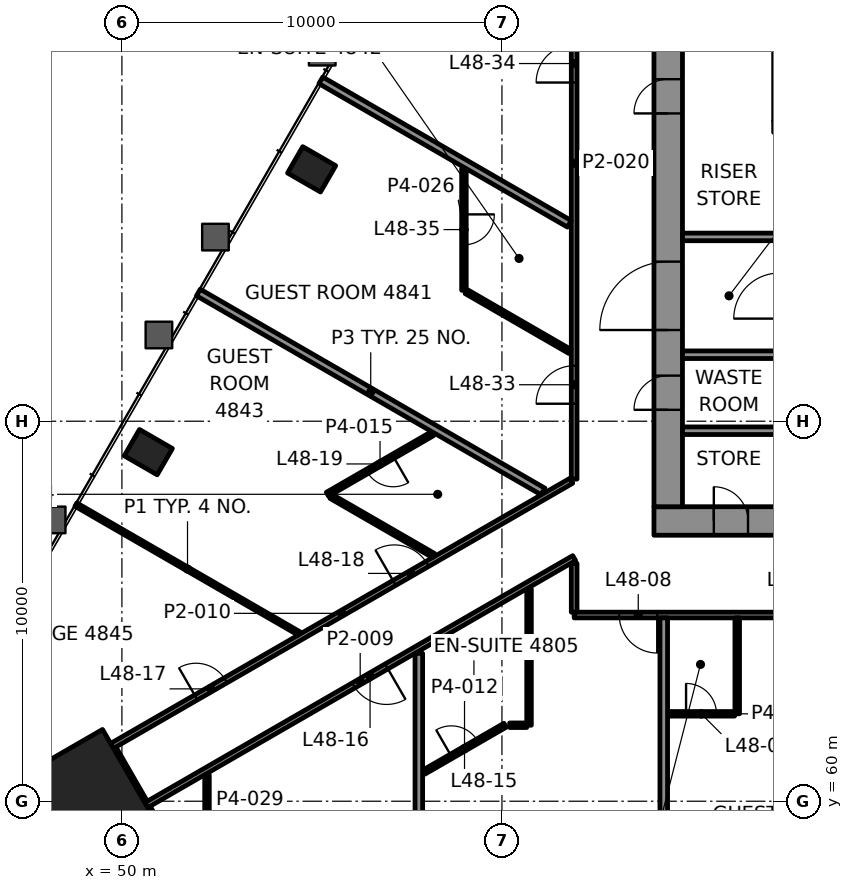
"""IFC4 building model, lengths in metres.
Left out: names, types, materials, properties, quantities, classifications, styles, units other than length and angle.
Written with IfcOpenShell. Run it as: python <this file> out.ifc"""

import sys

from ifc_helpers import new_model, si_unit, direction, frame, frame_2d, origin, origin_2d, place, context, subcontext, project, spatial, rectangle, hollow_rectangle, extrude, element, fill, save


model = new_model("IFC4")
c1 = context("Model", 3, precision=1e-05, world=origin(), true_north=direction((0.0, 1.0)))
c2 = subcontext(c1, "Body", "Model", "MODEL_VIEW")
j1 = project(units=[si_unit("LENGTHUNIT", "METRE"), si_unit("PLANEANGLEUNIT", "RADIAN")], contexts=[c1])
p1 = place(None, origin())
s1 = spatial("IfcSite", under=j1, at=p1, CompositionType="ELEMENT")
p2 = place(p1, origin())
s2 = spatial("IfcBuilding", under=s1, at=p2, CompositionType="ELEMENT")
p3 = place(p2, frame((0.0, 0.0, 206.5)))
s3 = spatial("IfcBuildingStorey", under=s2, at=p3, CompositionType="ELEMENT", Elevation=206.5)
p4 = place(p3, frame((48.978, 59.976, 0.0), z_axis=(0.0, 0.0, 1.0), x_axis=(0.5, -0.866025403784, 0.0)))
e1 = element("IfcColumn", 1, at=p4, inside=s3, PredefinedType="COLUMN", context=c2, shape_type="SweptSolid", body=[
    extrude(rectangle(XDim=2.8, YDim=2.8, at=origin_2d()), origin(), (0.0, 0.0, 1.0), 3.9),
])
for number, where, z_axis, x_axis in (
    (2, (54.992, 76.628, -0.0), (0.0, 0.0, 1.0), (-0.5, -0.866, 0.0)),
    (3, (50.695, 69.186, -0.0), (0.0, 0.0, 1.0), (-0.5, -0.866, 0.0)),
):
    element("IfcColumn", number, at=place(p3, frame(where, z_axis=z_axis, x_axis=x_axis)), inside=s3, PredefinedType="COLUMN", context=c2, shape_type="SweptSolid", body=[
        extrude(hollow_rectangle(XDim=0.8, YDim=1.0, WallThickness=0.05, at=origin_2d()), origin(), (0.0, 0.0, 1.0), 3.9),
    ])
p5 = place(p3, frame((64.0, 67.375, 0.0), z_axis=(0.0, 0.0, 1.0), x_axis=(1.0, 0.0, 0.0)))
e4 = element("IfcWall", 4, at=p5, inside=s3, PredefinedType="SHEAR", context=c2, shape_type="SweptSolid", body=[
    extrude(rectangle(XDim=22.0, YDim=0.75, at=frame_2d((11.0, 0.0))), origin(), (0.0, 0.0, 1.0), 3.7),
])
p6 = place(p5, frame((1.575, 0.0, 0.0)))
e5 = element("IfcOpeningElement", 5, at=p6, cuts=e4, PredefinedType="OPENING", context=c2, shape_type="SweptSolid", body=[
    extrude(rectangle(XDim=0.9, YDim=2.1, at=frame_2d((0.45, 1.05))), frame((0.0, 0.385, 0.0), z_axis=(0.0, -1.0, 0.0), x_axis=(1.0, 0.0, 0.0)), (0.0, 0.0, 1.0), 0.77),
])
p7 = place(p5, frame((4.425, 0.0, 0.0)))
e6 = element("IfcOpeningElement", 6, at=p7, cuts=e4, PredefinedType="OPENING", context=c2, shape_type="SweptSolid", body=[
    extrude(rectangle(XDim=0.9, YDim=2.1, at=frame_2d((0.45, 1.05))), frame((0.0, 0.385, 0.0), z_axis=(0.0, -1.0, 0.0), x_axis=(1.0, 0.0, 0.0)), (0.0, 0.0, 1.0), 0.77),
])
p8 = place(p3, frame((64.375, 67.75, 0.0), z_axis=(0.0, 0.0, 1.0), x_axis=(0.0, 1.0, 0.0)))
e7 = element("IfcWall", 7, at=p8, inside=s3, PredefinedType="SHEAR", context=c2, shape_type="SweptSolid", body=[
    extrude(rectangle(XDim=14.5, YDim=0.75, at=frame_2d((7.25, 0.0))), origin(), (0.0, 0.0, 1.0), 3.7),
])
p9 = place(p8, frame((4.65, 0.0, 0.0)))
e8 = element("IfcOpeningElement", 8, at=p9, cuts=e7, PredefinedType="OPENING", context=c2, shape_type="SweptSolid", body=[
    extrude(rectangle(XDim=1.8, YDim=2.1, at=frame_2d((0.9, 1.05))), frame((0.0, 0.385, 0.0), z_axis=(0.0, -1.0, 0.0), x_axis=(1.0, 0.0, 0.0)), (0.0, 0.0, 1.0), 0.77),
])
p10 = place(p8, frame((2.55, 0.0, 0.0)))
e9 = element("IfcOpeningElement", 9, at=p10, cuts=e7, PredefinedType="OPENING", context=c2, shape_type="SweptSolid", body=[
    extrude(rectangle(XDim=0.9, YDim=2.1, at=frame_2d((0.45, 1.05))), frame((0.0, 0.385, 0.0), z_axis=(0.0, -1.0, 0.0), x_axis=(1.0, 0.0, 0.0)), (0.0, 0.0, 1.0), 0.77),
])
p11 = place(p8, frame((10.35, 0.0, 0.0)))
e10 = element("IfcOpeningElement", 10, at=p11, cuts=e7, PredefinedType="OPENING", context=c2, shape_type="SweptSolid", body=[
    extrude(rectangle(XDim=0.9, YDim=2.1, at=frame_2d((0.45, 1.05))), frame((0.0, 0.385, 0.0), z_axis=(0.0, -1.0, 0.0), x_axis=(1.0, 0.0, 0.0)), (0.0, 0.0, 1.0), 0.77),
])
p12 = place(p3, frame((60.203, 62.0, 0.0), z_axis=(0.0, 0.0, 1.0), x_axis=(1.0, 0.0, 0.0)))
e11 = element("IfcWall", 11, at=p12, inside=s3, PredefinedType="PARTITIONING", context=c2, shape_type="SweptSolid", body=[
    extrude(rectangle(XDim=0.449, YDim=0.12, at=frame_2d((0.225, 0.0))), origin(), (0.0, 0.0, 1.0), 3.1),
])
p13 = place(p3, frame((64.368, 62.3, 0.0), z_axis=(0.0, 0.0, 1.0), x_axis=(1.0, 0.0, 0.0)))
e12 = element("IfcWall", 12, at=p13, inside=s3, PredefinedType="PARTITIONING", context=c2, shape_type="SweptSolid", body=[
    extrude(rectangle(XDim=1.753, YDim=0.12, at=frame_2d((0.877, 0.0))), origin(), (0.0, 0.0, 1.0), 3.1),
])
p14 = place(p13, frame((0.477, 0.0, 0.0)))
e13 = element("IfcOpeningElement", 13, at=p14, cuts=e12, PredefinedType="OPENING", context=c2, shape_type="SweptSolid", body=[
    extrude(rectangle(XDim=0.8, YDim=2.1, at=frame_2d((0.4, 1.05))), frame((0.0, 0.07, 0.0), z_axis=(0.0, -1.0, 0.0), x_axis=(1.0, 0.0, 0.0)), (0.0, 0.0, 1.0), 0.14),
])
p15 = place(p3, frame((88.1, 64.9, 0.0), z_axis=(0.0, 0.0, 1.0), x_axis=(-1.0, 0.0, 0.0)))
e14 = element("IfcWall", 14, at=p15, inside=s3, PredefinedType="PARTITIONING", context=c2, shape_type="SweptSolid", body=[
    extrude(rectangle(XDim=26.2, YDim=0.15, at=frame_2d((13.1, 0.0))), origin(), (0.0, 0.0, 1.0), 3.1),
])
p16 = place(p15, frame((7.443, 0.0, 0.0)))
e15 = element("IfcOpeningElement", 15, at=p16, cuts=e14, PredefinedType="OPENING", context=c2, shape_type="SweptSolid", body=[
    extrude(rectangle(XDim=1.0, YDim=2.1, at=frame_2d((0.5, 1.05))), frame((0.0, 0.085, 0.0), z_axis=(0.0, -1.0, 0.0), x_axis=(1.0, 0.0, 0.0)), (0.0, 0.0, 1.0), 0.17),
])
p17 = place(p15, frame((16.037, 0.0, 0.0)))
e16 = element("IfcOpeningElement", 16, at=p17, cuts=e14, PredefinedType="OPENING", context=c2, shape_type="SweptSolid", body=[
    extrude(rectangle(XDim=1.0, YDim=2.1, at=frame_2d((0.5, 1.05))), frame((0.0, 0.085, 0.0), z_axis=(0.0, -1.0, 0.0), x_axis=(1.0, 0.0, 0.0)), (0.0, 0.0, 1.0), 0.17),
])
p18 = place(p15, frame((19.747, 0.0, 0.0)))
e17 = element("IfcOpeningElement", 17, at=p18, cuts=e14, PredefinedType="OPENING", context=c2, shape_type="SweptSolid", body=[
    extrude(rectangle(XDim=1.0, YDim=2.1, at=frame_2d((0.5, 1.05))), frame((0.0, 0.085, 0.0), z_axis=(0.0, -1.0, 0.0), x_axis=(1.0, 0.0, 0.0)), (0.0, 0.0, 1.0), 0.17),
])
p19 = place(p15, frame((24.013, 0.0, 0.0)))
e18 = element("IfcOpeningElement", 18, at=p19, cuts=e14, PredefinedType="OPENING", context=c2, shape_type="SweptSolid", body=[
    extrude(rectangle(XDim=1.0, YDim=2.1, at=frame_2d((0.5, 1.05))), frame((0.0, 0.085, 0.0), z_axis=(0.0, -1.0, 0.0), x_axis=(1.0, 0.0, 0.0)), (0.0, 0.0, 1.0), 0.17),
])
p20 = place(p3, frame((57.947, 60.767, 0.0), z_axis=(0.0, 0.0, 1.0), x_axis=(0.866060325455, 0.499939509014, 0.0)))
e19 = element("IfcWall", 19, at=p20, inside=s3, PredefinedType="PARTITIONING", context=c2, shape_type="SweptSolid", body=[
    extrude(rectangle(XDim=2.467, YDim=0.12, at=frame_2d((1.233, 0.0))), origin(), (0.0, 0.0, 1.0), 3.1),
])
p21 = place(p20, frame((0.833, 0.0, 0.0)))
e20 = element("IfcOpeningElement", 20, at=p21, cuts=e19, PredefinedType="OPENING", context=c2, shape_type="SweptSolid", body=[
    extrude(rectangle(XDim=0.8, YDim=2.1, at=frame_2d((0.4, 1.05))), frame((0.0, 0.07, 0.0), z_axis=(0.0, -1.0, 0.0), x_axis=(1.0, 0.0, 0.0)), (0.0, 0.0, 1.0), 0.14),
])
p22 = place(p3, frame((61.9, 66.397, 0.0), z_axis=(0.0, 0.0, 1.0), x_axis=(-0.866028610752, -0.499994445327, 0.0)))
e21 = element("IfcWall", 21, at=p22, inside=s3, PredefinedType="PARTITIONING", context=c2, shape_type="SweptSolid", body=[
    extrude(rectangle(XDim=13.002, YDim=0.15, at=frame_2d((6.501, 0.0))), origin(), (0.0, 0.0, 1.0), 2.947),
])
p23 = place(p22, frame((5.701, 0.0, 0.0)))
e22 = element("IfcOpeningElement", 22, at=p23, cuts=e21, PredefinedType="OPENING", context=c2, shape_type="SweptSolid", body=[
    extrude(rectangle(XDim=1.0, YDim=2.1, at=frame_2d((0.5, 1.05))), frame((0.0, 0.085, 0.0), z_axis=(0.0, -1.0, 0.0), x_axis=(1.0, 0.0, 0.0)), (0.0, 0.0, 1.0), 0.17),
])
p24 = place(p3, frame((49.74, 61.456, 0.0), z_axis=(0.0, 0.0, 1.0), x_axis=(0.866030582951, 0.499991029314, 0.0)))
e23 = element("IfcWall", 23, at=p24, inside=s3, PredefinedType="PARTITIONING", context=c2, shape_type="SweptSolid", body=[
    extrude(rectangle(XDim=13.954, YDim=0.15, at=frame_2d((6.977, 0.0))), origin(), (0.0, 0.0, 1.0), 3.1),
])
p25 = place(p24, frame((2.552, 0.0, 0.0)))
e24 = element("IfcOpeningElement", 24, at=p25, cuts=e23, PredefinedType="OPENING", context=c2, shape_type="SweptSolid", body=[
    extrude(rectangle(XDim=0.9, YDim=2.1, at=frame_2d((0.45, 1.05))), frame((0.0, 0.085, 0.0), z_axis=(0.0, -1.0, 0.0), x_axis=(1.0, 0.0, 0.0)), (0.0, 0.0, 1.0), 0.17),
])
p26 = place(p24, frame((8.579, 0.0, 0.0)))
e25 = element("IfcOpeningElement", 25, at=p26, cuts=e23, PredefinedType="OPENING", context=c2, shape_type="SweptSolid", body=[
    extrude(rectangle(XDim=1.0, YDim=2.1, at=frame_2d((0.5, 1.05))), frame((0.0, 0.085, 0.0), z_axis=(0.0, -1.0, 0.0), x_axis=(1.0, 0.0, 0.0)), (0.0, 0.0, 1.0), 0.17),
])
p27 = place(p3, frame((58.175, 69.674, 0.0), z_axis=(0.0, 0.0, 1.0), x_axis=(-0.866051923801, -0.49995406317, 0.0)))
e26 = element("IfcWall", 26, at=p27, inside=s3, PredefinedType="PARTITIONING", context=c2, shape_type="SweptSolid", body=[
    extrude(rectangle(XDim=3.194, YDim=0.12, at=frame_2d((1.597, 0.0))), origin(), (0.0, 0.0, 1.0), 3.1),
])
p28 = place(p27, frame((1.197, 0.0, 0.0)))
e27 = element("IfcOpeningElement", 27, at=p28, cuts=e26, PredefinedType="OPENING", context=c2, shape_type="SweptSolid", body=[
    extrude(rectangle(XDim=0.8, YDim=2.1, at=frame_2d((0.4, 1.05))), frame((0.0, 0.07, 0.0), z_axis=(0.0, -1.0, 0.0), x_axis=(1.0, 0.0, 0.0)), (0.0, 0.0, 1.0), 0.14),
])
p29 = place(p3, frame((66.191, 62.3, 0.0), z_axis=(0.0, 0.0, 1.0), x_axis=(0.0, 1.0, 0.0)))
e28 = element("IfcWall", 28, at=p29, inside=s3, PredefinedType="PARTITIONING", context=c2, shape_type="SweptSolid", body=[
    extrude(rectangle(XDim=2.525, YDim=0.12, at=frame_2d((1.262, 0.0))), origin(), (0.0, 0.0, 1.0), 3.1),
])
p30 = place(p3, frame((64.258, 55.898, 0.0), z_axis=(0.0, 0.0, 1.0), x_axis=(0.0, 1.0, 0.0)))
e29 = element("IfcWall", 29, at=p30, inside=s3, PredefinedType="PARTITIONING", context=c2, shape_type="SweptSolid", body=[
    extrude(rectangle(XDim=8.927, YDim=0.2, at=frame_2d((4.463, 0.0))), origin(), (0.0, 0.0, 1.0), 3.022),
])
p31 = place(p3, frame((61.9, 64.975, 0.0), z_axis=(0.0, 0.0, 1.0), x_axis=(0.0, 1.0, 0.0)))
e30 = element("IfcWall", 30, at=p31, inside=s3, PredefinedType="PARTITIONING", context=c2, shape_type="SweptSolid", body=[
    extrude(rectangle(XDim=1.286, YDim=0.15, at=frame_2d((0.643, 0.0))), origin(), (0.0, 0.0, 1.0), 2.947),
])
p32 = place(p3, frame((61.9, 68.476, 0.0), z_axis=(0.0, 0.0, 1.0), x_axis=(0.0, 1.0, 0.0)))
e31 = element("IfcWall", 31, at=p32, inside=s3, PredefinedType="PARTITIONING", context=c2, shape_type="SweptSolid", body=[
    extrude(rectangle(XDim=16.624, YDim=0.15, at=frame_2d((8.312, 0.0))), origin(), (0.0, 0.0, 1.0), 3.1),
])
p33 = place(p32, frame((1.984, 0.0, 0.0)))
e32 = element("IfcOpeningElement", 32, at=p33, cuts=e31, PredefinedType="OPENING", context=c2, shape_type="SweptSolid", body=[
    extrude(rectangle(XDim=1.0, YDim=2.1, at=frame_2d((0.5, 1.05))), frame((0.0, 0.085, 0.0), z_axis=(0.0, -1.0, 0.0), x_axis=(1.0, 0.0, 0.0)), (0.0, 0.0, 1.0), 0.17),
])
p34 = place(p32, frame((10.437, 0.0, 0.0)))
e33 = element("IfcOpeningElement", 33, at=p34, cuts=e31, PredefinedType="OPENING", context=c2, shape_type="SweptSolid", body=[
    extrude(rectangle(XDim=1.0, YDim=2.1, at=frame_2d((0.5, 1.05))), frame((0.0, 0.085, 0.0), z_axis=(0.0, -1.0, 0.0), x_axis=(1.0, 0.0, 0.0)), (0.0, 0.0, 1.0), 0.17),
])
p35 = place(p3, frame((60.713, 62.0, 0.0), z_axis=(0.0, 0.0, 1.0), x_axis=(0.0, 1.0, 0.0)))
e34 = element("IfcWall", 34, at=p35, inside=s3, PredefinedType="PARTITIONING", context=c2, shape_type="SweptSolid", body=[
    extrude(rectangle(XDim=3.585, YDim=0.12, at=frame_2d((1.793, 0.0))), origin(), (0.0, 0.0, 1.0), 2.947),
])
p36 = place(p3, frame((59.0, 76.64, 0.0), z_axis=(0.0, 0.0, 1.0), x_axis=(0.0, -1.0, 0.0)))
e35 = element("IfcWall", 35, at=p36, inside=s3, PredefinedType="PARTITIONING", context=c2, shape_type="SweptSolid", body=[
    extrude(rectangle(XDim=3.194, YDim=0.12, at=frame_2d((1.597, 0.0))), origin(), (0.0, 0.0, 1.0), 3.1),
])
p37 = place(p36, frame((1.197, 0.0, 0.0)))
e36 = element("IfcOpeningElement", 36, at=p37, cuts=e35, PredefinedType="OPENING", context=c2, shape_type="SweptSolid", body=[
    extrude(rectangle(XDim=0.8, YDim=2.1, at=frame_2d((0.4, 1.05))), frame((0.0, 0.07, 0.0), z_axis=(0.0, -1.0, 0.0), x_axis=(1.0, 0.0, 0.0)), (0.0, 0.0, 1.0), 0.14),
])
p38 = place(p3, frame((57.813, 57.358, 0.0), z_axis=(0.0, 0.0, 1.0), x_axis=(0.0, 1.0, 0.0)))
e37 = element("IfcWall", 37, at=p38, inside=s3, PredefinedType="PARTITIONING", context=c2, shape_type="SweptSolid", body=[
    extrude(rectangle(XDim=6.532, YDim=0.2, at=frame_2d((3.266, 0.0))), origin(), (0.0, 0.0, 1.0), 3.1),
])
p39 = place(p3, frame((52.239, 57.125, 0.0), z_axis=(0.0, 0.0, 1.0), x_axis=(0.0, 1.0, 0.0)))
e38 = element("IfcWall", 38, at=p39, inside=s3, PredefinedType="PARTITIONING", context=c2, shape_type="SweptSolid", body=[
    extrude(rectangle(XDim=3.569, YDim=0.12, at=frame_2d((1.784, 0.0))), origin(), (0.0, 0.0, 1.0), 3.1),
])
p40 = place(p39, frame((1.384, 0.0, 0.0)))
e39 = element("IfcOpeningElement", 39, at=p40, cuts=e38, PredefinedType="OPENING", context=c2, shape_type="SweptSolid", body=[
    extrude(rectangle(XDim=0.8, YDim=2.1, at=frame_2d((0.4, 1.05))), frame((0.0, 0.07, 0.0), z_axis=(0.0, -1.0, 0.0), x_axis=(1.0, 0.0, 0.0)), (0.0, 0.0, 1.0), 0.14),
])
p41 = place(p3, frame((50.86, 59.516, 0.0), z_axis=(0.0, 0.0, 1.0), x_axis=(-0.499741784413, 0.866174433305, 0.0)))
e40 = element("IfcWall", 40, at=p41, inside=s3, PredefinedType="PARTITIONING", context=c2, shape_type="SweptSolid", body=[
    extrude(rectangle(XDim=0.365, YDim=0.15, at=frame_2d((0.182, 0.0))), origin(), (0.0, 0.0, 1.0), 3.1),
])
p42 = place(p3, frame((61.773, 75.195, 0.0), z_axis=(0.0, 0.0, 1.0), x_axis=(-0.866025649656, 0.499999574138, 0.0)))
e41 = element("IfcWall", 41, at=p42, inside=s3, PredefinedType="PARTITIONING", context=c2, shape_type="SweptSolid", body=[
    extrude(rectangle(XDim=7.55, YDim=0.2, at=frame_2d((3.775, 0.0))), origin(), (0.0, 0.0, 1.0), 3.022),
])
p43 = place(p3, frame((61.79, 71.835, 0.0), z_axis=(0.0, 0.0, 1.0), x_axis=(-0.866028267601, 0.499995039691, 0.0)))
e42 = element("IfcWall", 42, at=p43, inside=s3, PredefinedType="PARTITIONING", context=c2, shape_type="SweptSolid", body=[
    extrude(rectangle(XDim=3.153, YDim=0.12, at=frame_2d((1.576, 0.0))), origin(), (0.0, 0.0, 1.0), 3.1),
])
p44 = place(p3, frame((61.082, 68.15, 0.0), z_axis=(0.0, 0.0, 1.0), x_axis=(-0.866022549299, 0.50000494408, 0.0)))
e43 = element("IfcWall", 43, at=p44, inside=s3, PredefinedType="PARTITIONING", context=c2, shape_type="SweptSolid", body=[
    extrude(rectangle(XDim=10.474, YDim=0.2, at=frame_2d((5.237, 0.0))), origin(), (0.0, 0.0, 1.0), 3.022),
])
p45 = place(p3, frame((58.199, 66.466, 0.0), z_axis=(0.0, 0.0, 1.0), x_axis=(-0.866028856698, 0.499994019331, 0.0)))
e44 = element("IfcWall", 44, at=p45, inside=s3, PredefinedType="PARTITIONING", context=c2, shape_type="SweptSolid", body=[
    extrude(rectangle(XDim=3.113, YDim=0.12, at=frame_2d((1.556, 0.0))), origin(), (0.0, 0.0, 1.0), 3.1),
])
p46 = place(p3, frame((54.663, 64.414, 0.0), z_axis=(0.0, 0.0, 1.0), x_axis=(-0.866023732449, 0.500002894826, 0.0)))
e45 = element("IfcWall", 45, at=p46, inside=s3, PredefinedType="PARTITIONING", context=c2, shape_type="SweptSolid", body=[
    extrude(rectangle(XDim=6.782, YDim=0.1, at=frame_2d((3.391, 0.0))), origin(), (0.0, 0.0, 1.0), 3.1),
])
p47 = place(p3, frame((50.603, 59.962, 0.0), z_axis=(0.0, 0.0, 1.0), x_axis=(-0.499991515992, 0.866030301974, 0.0)))
e46 = element("IfcWall", 46, at=p47, inside=s3, PredefinedType="PARTITIONING", context=c2, shape_type="SweptSolid", body=[
    extrude(rectangle(XDim=1.649, YDim=0.15, at=frame_2d((0.825, 0.0))), origin(), (0.0, 0.0, 1.0), 2.947),
])
p48 = place(p3, frame((64.75, 69.75, 0.0), z_axis=(0.0, 0.0, 1.0), x_axis=(1.0, 0.0, 0.0)))
e47 = element("IfcWall", 47, at=p48, inside=s3, PredefinedType="PARTITIONING", context=c2, shape_type="SweptSolid", body=[
    extrude(rectangle(XDim=2.45, YDim=0.2, at=frame_2d((1.225, 0.0))), origin(), (0.0, 0.0, 1.0), 3.7),
])
p49 = place(p3, frame((64.75, 71.75, 0.0), z_axis=(0.0, 0.0, 1.0), x_axis=(1.0, 0.0, 0.0)))
e48 = element("IfcWall", 48, at=p49, inside=s3, PredefinedType="PARTITIONING", context=c2, shape_type="SweptSolid", body=[
    extrude(rectangle(XDim=5.55, YDim=0.2, at=frame_2d((2.775, 0.0))), origin(), (0.0, 0.0, 1.0), 3.7),
])
p50 = place(p3, frame((64.75, 74.85, 0.0), z_axis=(0.0, 0.0, 1.0), x_axis=(1.0, 0.0, 0.0)))
e49 = element("IfcWall", 49, at=p50, inside=s3, PredefinedType="PARTITIONING", context=c2, shape_type="SweptSolid", body=[
    extrude(rectangle(XDim=2.45, YDim=0.2, at=frame_2d((1.225, 0.0))), origin(), (0.0, 0.0, 1.0), 3.7),
])
p51 = place(p14, origin())
e50 = element("IfcDoor", 50, at=p51, inside=s3, OperationType="SINGLE_SWING_RIGHT", PredefinedType="DOOR", context=c2, shape_type="SweptSolid", body=[
    extrude(rectangle(XDim=0.8, YDim=2.1, at=frame_2d((0.4, 1.05))), frame((0.0, 0.025, 0.0), z_axis=(0.0, -1.0, 0.0), x_axis=(1.0, 0.0, 0.0)), (0.0, 0.0, 1.0), 0.05),
])
fill(e13, e50)
p52 = place(p19, origin())
e51 = element("IfcDoor", 51, at=p52, inside=s3, OperationType="SINGLE_SWING_RIGHT", PredefinedType="DOOR", context=c2, shape_type="SweptSolid", body=[
    extrude(rectangle(XDim=1.0, YDim=2.1, at=frame_2d((0.5, 1.05))), frame((0.0, 0.025, 0.0), z_axis=(0.0, -1.0, 0.0), x_axis=(1.0, 0.0, 0.0)), (0.0, 0.0, 1.0), 0.05),
])
fill(e18, e51)
p53 = place(p21, origin())
e52 = element("IfcDoor", 52, at=p53, inside=s3, OperationType="SINGLE_SWING_RIGHT", PredefinedType="DOOR", context=c2, shape_type="SweptSolid", body=[
    extrude(rectangle(XDim=0.8, YDim=2.1, at=frame_2d((0.4, 1.05))), frame((0.0, 0.025, 0.0), z_axis=(0.0, -1.0, 0.0), x_axis=(1.0, 0.0, 0.0)), (0.0, 0.0, 1.0), 0.05),
])
fill(e20, e52)
p54 = place(p23, origin())
e53 = element("IfcDoor", 53, at=p54, inside=s3, OperationType="SINGLE_SWING_RIGHT", PredefinedType="DOOR", context=c2, shape_type="SweptSolid", body=[
    extrude(rectangle(XDim=1.0, YDim=2.1, at=frame_2d((0.5, 1.05))), frame((0.0, 0.025, 0.0), z_axis=(0.0, -1.0, 0.0), x_axis=(1.0, 0.0, 0.0)), (0.0, 0.0, 1.0), 0.05),
])
fill(e22, e53)
p55 = place(p25, origin())
e54 = element("IfcDoor", 54, at=p55, inside=s3, OperationType="SINGLE_SWING_RIGHT", PredefinedType="DOOR", context=c2, shape_type="SweptSolid", body=[
    extrude(rectangle(XDim=0.9, YDim=2.1, at=frame_2d((0.45, 1.05))), frame((0.0, 0.025, 0.0), z_axis=(0.0, -1.0, 0.0), x_axis=(1.0, 0.0, 0.0)), (0.0, 0.0, 1.0), 0.05),
])
fill(e24, e54)
p56 = place(p26, origin())
e55 = element("IfcDoor", 55, at=p56, inside=s3, OperationType="SINGLE_SWING_RIGHT", PredefinedType="DOOR", context=c2, shape_type="SweptSolid", body=[
    extrude(rectangle(XDim=1.0, YDim=2.1, at=frame_2d((0.5, 1.05))), frame((0.0, 0.025, 0.0), z_axis=(0.0, -1.0, 0.0), x_axis=(1.0, 0.0, 0.0)), (0.0, 0.0, 1.0), 0.05),
])
fill(e25, e55)
p57 = place(p28, origin())
e56 = element("IfcDoor", 56, at=p57, inside=s3, OperationType="SINGLE_SWING_RIGHT", PredefinedType="DOOR", context=c2, shape_type="SweptSolid", body=[
    extrude(rectangle(XDim=0.8, YDim=2.1, at=frame_2d((0.4, 1.05))), frame((0.0, 0.025, 0.0), z_axis=(0.0, -1.0, 0.0), x_axis=(1.0, 0.0, 0.0)), (0.0, 0.0, 1.0), 0.05),
])
fill(e27, e56)
p58 = place(p33, origin())
e57 = element("IfcDoor", 57, at=p58, inside=s3, OperationType="SINGLE_SWING_RIGHT", PredefinedType="DOOR", context=c2, shape_type="SweptSolid", body=[
    extrude(rectangle(XDim=1.0, YDim=2.1, at=frame_2d((0.5, 1.05))), frame((0.0, 0.025, 0.0), z_axis=(0.0, -1.0, 0.0), x_axis=(1.0, 0.0, 0.0)), (0.0, 0.0, 1.0), 0.05),
])
fill(e32, e57)
p59 = place(p34, origin())
e58 = element("IfcDoor", 58, at=p59, inside=s3, OperationType="SINGLE_SWING_RIGHT", PredefinedType="DOOR", context=c2, shape_type="SweptSolid", body=[
    extrude(rectangle(XDim=1.0, YDim=2.1, at=frame_2d((0.5, 1.05))), frame((0.0, 0.025, 0.0), z_axis=(0.0, -1.0, 0.0), x_axis=(1.0, 0.0, 0.0)), (0.0, 0.0, 1.0), 0.05),
])
fill(e33, e58)
p60 = place(p37, origin())
e59 = element("IfcDoor", 59, at=p60, inside=s3, OperationType="SINGLE_SWING_RIGHT", PredefinedType="DOOR", context=c2, shape_type="SweptSolid", body=[
    extrude(rectangle(XDim=0.8, YDim=2.1, at=frame_2d((0.4, 1.05))), frame((0.0, 0.025, 0.0), z_axis=(0.0, -1.0, 0.0), x_axis=(1.0, 0.0, 0.0)), (0.0, 0.0, 1.0), 0.05),
])
fill(e36, e59)
p61 = place(p9, origin())
e60 = element("IfcDoor", 60, at=p61, inside=s3, OperationType="SINGLE_SWING_LEFT", PredefinedType="DOOR", context=c2, shape_type="SweptSolid", body=[
    extrude(rectangle(XDim=1.8, YDim=2.1, at=frame_2d((0.9, 1.05))), frame((0.0, 0.095, 0.0), z_axis=(0.0, -1.0, 0.0), x_axis=(1.0, 0.0, 0.0)), (0.0, 0.0, 1.0), 0.19),
])
fill(e8, e60)
p62 = place(p6, origin())
e61 = element("IfcDoor", 61, at=p62, inside=s3, OperationType="SINGLE_SWING_LEFT", PredefinedType="DOOR", context=c2, shape_type="SweptSolid", body=[
    extrude(rectangle(XDim=0.9, YDim=2.1, at=frame_2d((0.45, 1.05))), frame((0.0, 0.095, 0.0), z_axis=(0.0, -1.0, 0.0), x_axis=(1.0, 0.0, 0.0)), (0.0, 0.0, 1.0), 0.19),
])
fill(e5, e61)
p63 = place(p10, origin())
e62 = element("IfcDoor", 62, at=p63, inside=s3, OperationType="SINGLE_SWING_RIGHT", PredefinedType="DOOR", context=c2, shape_type="SweptSolid", body=[
    extrude(rectangle(XDim=0.9, YDim=2.1, at=frame_2d((0.45, 1.05))), frame((0.0, 0.095, 0.0), z_axis=(0.0, -1.0, 0.0), x_axis=(1.0, 0.0, 0.0)), (0.0, 0.0, 1.0), 0.19),
])
fill(e9, e62)
p64 = place(p11, origin())
e63 = element("IfcDoor", 63, at=p64, inside=s3, OperationType="SINGLE_SWING_RIGHT", PredefinedType="DOOR", context=c2, shape_type="SweptSolid", body=[
    extrude(rectangle(XDim=0.9, YDim=2.1, at=frame_2d((0.45, 1.05))), frame((0.0, 0.095, 0.0), z_axis=(0.0, -1.0, 0.0), x_axis=(1.0, 0.0, 0.0)), (0.0, 0.0, 1.0), 0.19),
])
fill(e10, e63)
save(model, sys.argv[1])
